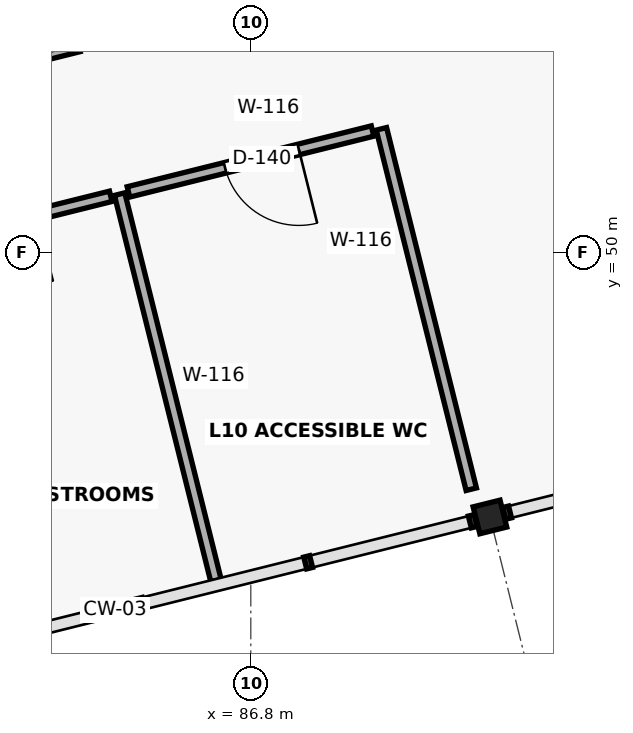
"""IFC4 building model, lengths in metres.
Left out: names, types, materials, properties, quantities, classifications, styles, units other than length and angle.
Written with IfcOpenShell. Run it as: python <this file> out.ifc"""

import sys

from ifc_helpers import new_model, si_unit, direction, frame, frame_2d, origin, origin_2d, place, context, subcontext, project, spatial, rectangle, extrude, element, fill, save


model = new_model("IFC4")
c1 = context("Model", 3, precision=1e-05, world=origin(), true_north=direction((0.0, 1.0)))
c2 = subcontext(c1, "Body", "Model", "MODEL_VIEW")
j1 = project(units=[si_unit("LENGTHUNIT", "METRE"), si_unit("PLANEANGLEUNIT", "RADIAN")], contexts=[c1])
p1 = place(None, origin())
s1 = spatial("IfcSite", under=j1, at=p1, CompositionType="ELEMENT")
p2 = place(p1, origin())
s2 = spatial("IfcBuilding", under=s1, at=p2, CompositionType="ELEMENT")
p3 = place(p2, frame((0.0, 0.0, 41.7)))
s3 = spatial("IfcBuildingStorey", under=s2, at=p3, CompositionType="ELEMENT", Elevation=41.7)
p4 = place(p3, frame((89.947, 46.522, 0.0), z_axis=(0.0, 0.0, 1.0), x_axis=(0.970295726276, 0.2419218956, 0.0)))
e1 = element("IfcColumn", 1, at=p4, inside=s3, PredefinedType="COLUMN", context=c2, shape_type="SweptSolid", body=[
    extrude(rectangle(XDim=0.365, YDim=0.365, at=origin_2d()), origin(), (0.0, 0.0, 1.0), 3.9),
])
p5 = place(p3, frame((81.34, 51.9, 0.0), z_axis=(0.0, 0.0, 1.0), x_axis=(0.970294627956, 0.24192630068, 0.0)))
e2 = element("IfcWall", 2, at=p5, inside=s3, PredefinedType="PARTITIONING", context=c2, shape_type="SweptSolid", body=[
    extrude(rectangle(XDim=3.3, YDim=0.112, at=frame_2d((1.65, 0.0))), origin(), (0.0, 0.0, 1.0), 3.7),
])
p6 = place(p3, frame((86.342, 45.685, 0.0), z_axis=(0.0, 0.0, 1.0), x_axis=(-0.24189974474, 0.970301248837, 0.0)))
e3 = element("IfcWall", 3, at=p6, inside=s3, PredefinedType="PLUMBINGWALL", context=c2, shape_type="SweptSolid", body=[
    extrude(rectangle(XDim=5.24, YDim=0.14, at=frame_2d((2.62, 0.0))), origin(), (0.0, 0.0, 1.0), 3.7),
])
p7 = place(p3, frame((84.958, 50.741, 0.0), z_axis=(0.0, 0.0, 1.0), x_axis=(-0.970289047109, -0.241948682698, 0.0)))
e4 = element("IfcWall", 4, at=p7, inside=s3, PredefinedType="PLUMBINGWALL", context=c2, shape_type="SweptSolid", body=[
    extrude(rectangle(XDim=3.23, YDim=0.14, at=frame_2d((1.615, 0.0))), origin(), (0.0, 0.0, 1.0), 3.7),
])
p8 = place(p7, frame((1.009, 0.0, 0.0)))
e5 = element("IfcOpeningElement", 5, at=p8, cuts=e4, PredefinedType="OPENING", context=c2, shape_type="SweptSolid", body=[
    extrude(rectangle(XDim=0.9, YDim=2.15, at=frame_2d((0.45, 1.075))), frame((0.0, 0.082, 0.0), z_axis=(0.0, -1.0, 0.0), x_axis=(1.0, 0.0, 0.0)), (0.0, 0.0, 1.0), 0.164),
])
p9 = place(p3, frame((89.701, 46.887, 0.0), z_axis=(0.0, 0.0, 1.0), x_axis=(-0.241912528441, 0.970298061723, 0.0)))
e6 = element("IfcWall", 6, at=p9, inside=s3, PredefinedType="PLUMBINGWALL", context=c2, shape_type="SweptSolid", body=[
    extrude(rectangle(XDim=4.886, YDim=0.14, at=frame_2d((2.443, 0.0))), origin(), (0.0, 0.0, 1.0), 3.7),
])
p10 = place(p3, frame((88.402, 51.6, 0.0), z_axis=(0.0, 0.0, 1.0), x_axis=(-0.970294165893, -0.241928153868, 0.0)))
e7 = element("IfcWall", 7, at=p10, inside=s3, PredefinedType="PLUMBINGWALL", context=c2, shape_type="SweptSolid", body=[
    extrude(rectangle(XDim=3.31, YDim=0.14, at=frame_2d((1.655, 0.0))), origin(), (0.0, 0.0, 1.0), 3.7),
])
p11 = place(p10, frame((1.0, 0.0, 0.0)))
e8 = element("IfcOpeningElement", 8, at=p11, cuts=e7, PredefinedType="OPENING", context=c2, shape_type="SweptSolid", body=[
    extrude(rectangle(XDim=1.0, YDim=2.15, at=frame_2d((0.5, 1.075))), frame((0.0, 0.082, 0.0), z_axis=(0.0, -1.0, 0.0), x_axis=(1.0, 0.0, 0.0)), (0.0, 0.0, 1.0), 0.164),
])
p12 = place(p11, origin())
e9 = element("IfcDoor", 9, at=p12, inside=s3, OperationType="SINGLE_SWING_LEFT", PredefinedType="DOOR", context=c2, shape_type="SweptSolid", body=[
    extrude(rectangle(XDim=1.0, YDim=2.15, at=frame_2d((0.5, 1.075))), frame((0.0, 0.025, 0.0), z_axis=(0.0, -1.0, 0.0), x_axis=(1.0, 0.0, 0.0)), (0.0, 0.0, 1.0), 0.05),
])
fill(e8, e9)
save(model, sys.argv[1])
